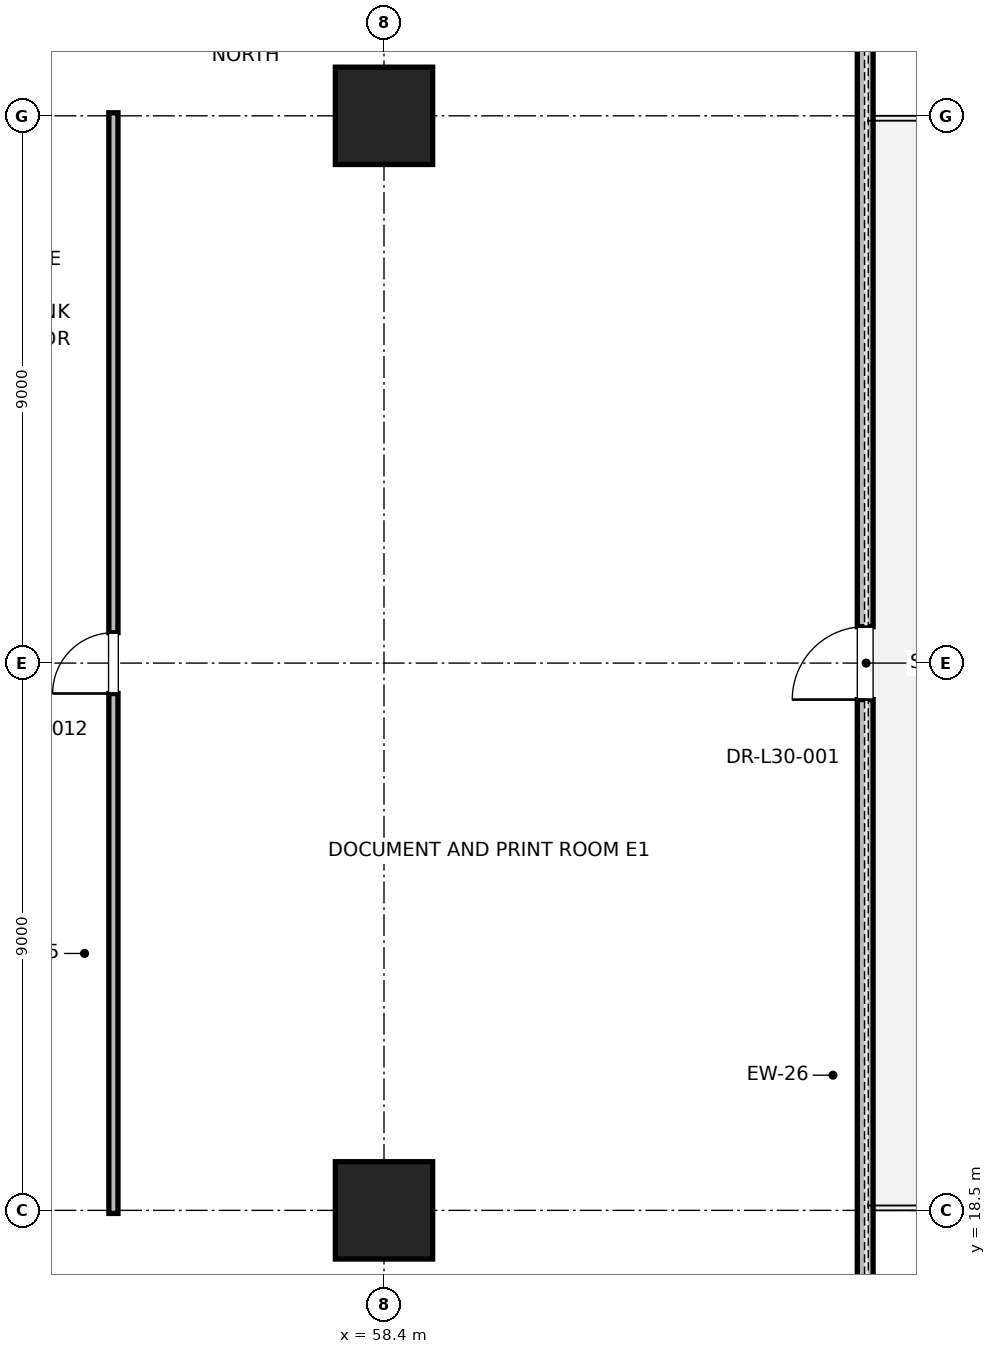
"""IFC4 building model, lengths in metres.
Left out: names, types, materials, properties, quantities, classifications, styles, units other than length and angle.
Written with IfcOpenShell. Run it as: python <this file> out.ifc"""

import sys

from ifc_helpers import new_model, si_unit, direction, frame, frame_2d, origin, origin_2d, place, context, subcontext, project, spatial, rectangle, extrude, element, fill, save


model = new_model("IFC4")
c1 = context("Model", 3, precision=1e-05, world=origin(), true_north=direction((0.0, 1.0)))
c2 = subcontext(c1, "Body", "Model", "MODEL_VIEW")
j1 = project(units=[si_unit("LENGTHUNIT", "METRE"), si_unit("PLANEANGLEUNIT", "RADIAN")], contexts=[c1])
p1 = place(None, origin())
s1 = spatial("IfcSite", under=j1, at=p1, CompositionType="ELEMENT")
p2 = place(p1, origin())
s2 = spatial("IfcBuilding", under=s1, at=p2, CompositionType="ELEMENT")
p3 = place(p2, frame((0.0, 0.0, 132.4)))
s3 = spatial("IfcBuildingStorey", under=s2, at=p3, CompositionType="ELEMENT", Elevation=132.4)
for number, where, z_axis, x_axis in (
    (1, (58.4, 18.5, 0.0), (0.0, 0.0, 1.0), (1.0, 0.0, 0.0)),
    (2, (58.4, 36.5, 0.0), (0.0, 0.0, 1.0), (1.0, 0.0, 0.0)),
):
    element("IfcColumn", number, at=place(p3, frame(where, z_axis=z_axis, x_axis=x_axis)), inside=s3, PredefinedType="COLUMN", context=c2, shape_type="SweptSolid", body=[
        extrude(rectangle(XDim=1.6, YDim=1.6, at=origin_2d()), origin(), (0.0, 0.0, 1.0), 4.0),
    ])
p4 = place(p3, frame((66.314, 8.346, 0.0), z_axis=(0.0, 0.0, 1.0), x_axis=(0.0, 1.0, 0.0)))
e3 = element("IfcWall", 3, at=p4, inside=s3, PredefinedType="PARAPET", context=c2, shape_type="SweptSolid", body=[
    extrude(rectangle(XDim=38.308, YDim=0.26, at=frame_2d((19.154, 0.0))), origin(), (0.0, 0.0, 1.0), 2.97),
])
p5 = place(p4, frame((4.2, 0.0, 0.85)))
e4 = element("IfcOpeningElement", 4, at=p5, cuts=e3, PredefinedType="OPENING", context=c2, shape_type="SweptSolid", body=[
    extrude(rectangle(XDim=2.0, YDim=2.3, at=frame_2d((1.0, 1.15))), frame((0.0, 0.13, 0.0), z_axis=(0.0, -1.0, 0.0), x_axis=(1.0, 0.0, 0.0)), (0.0, 0.0, 1.0), 0.26),
])
p6 = place(p4, frame((18.554, 0.0, 0.0)))
e5 = element("IfcOpeningElement", 5, at=p6, cuts=e3, PredefinedType="OPENING", context=c2, shape_type="SweptSolid", body=[
    extrude(rectangle(XDim=1.2, YDim=2.2, at=frame_2d((0.6, 1.1))), frame((0.0, 0.13, 0.0), z_axis=(0.0, -1.0, 0.0), x_axis=(1.0, 0.0, 0.0)), (0.0, 0.0, 1.0), 0.26),
])
p7 = place(p4, frame((32.107, 0.0, 0.85)))
e6 = element("IfcOpeningElement", 6, at=p7, cuts=e3, PredefinedType="OPENING", context=c2, shape_type="SweptSolid", body=[
    extrude(rectangle(XDim=2.0, YDim=2.3, at=frame_2d((1.0, 1.15))), frame((0.0, 0.13, 0.0), z_axis=(0.0, -1.0, 0.0), x_axis=(1.0, 0.0, 0.0)), (0.0, 0.0, 1.0), 0.26),
])
p8 = place(p3, frame((53.95, 18.45, 0.0), z_axis=(0.0, 0.0, 1.0), x_axis=(0.0, 1.0, 0.0)))
e7 = element("IfcWall", 7, at=p8, inside=s3, PredefinedType="PARTITIONING", context=c2, shape_type="SweptSolid", body=[
    extrude(rectangle(XDim=18.1, YDim=0.15, at=frame_2d((9.05, 0.0))), origin(), (0.0, 0.0, 1.0), 2.85),
])
p9 = place(p8, frame((8.55, 0.0, 0.0)))
e8 = element("IfcOpeningElement", 8, at=p9, cuts=e7, PredefinedType="OPENING", context=c2, shape_type="SweptSolid", body=[
    extrude(rectangle(XDim=1.0, YDim=2.15, at=frame_2d((0.5, 1.075))), frame((0.0, 0.075, 0.0), z_axis=(0.0, -1.0, 0.0), x_axis=(1.0, 0.0, 0.0)), (0.0, 0.0, 1.0), 0.15),
])
p10 = place(p6, origin())
e9 = element("IfcDoor", 9, at=p10, inside=s3, OperationType="SINGLE_SWING_LEFT", PredefinedType="DOOR", context=c2, shape_type="SweptSolid", body=[
    extrude(rectangle(XDim=1.2, YDim=2.2, at=frame_2d((0.6, 1.1))), frame((0.0, 0.025, 0.0), z_axis=(0.0, -1.0, 0.0), x_axis=(1.0, 0.0, 0.0)), (0.0, 0.0, 1.0), 0.05),
])
fill(e5, e9)
p11 = place(p9, origin())
e10 = element("IfcDoor", 10, at=p11, inside=s3, OperationType="SINGLE_SWING_LEFT", PredefinedType="DOOR", context=c2, shape_type="SweptSolid", body=[
    extrude(rectangle(XDim=1.0, YDim=2.15, at=frame_2d((0.5, 1.075))), frame((0.0, 0.025, 0.0), z_axis=(0.0, -1.0, 0.0), x_axis=(1.0, 0.0, 0.0)), (0.0, 0.0, 1.0), 0.05),
])
fill(e8, e10)
save(model, sys.argv[1])
